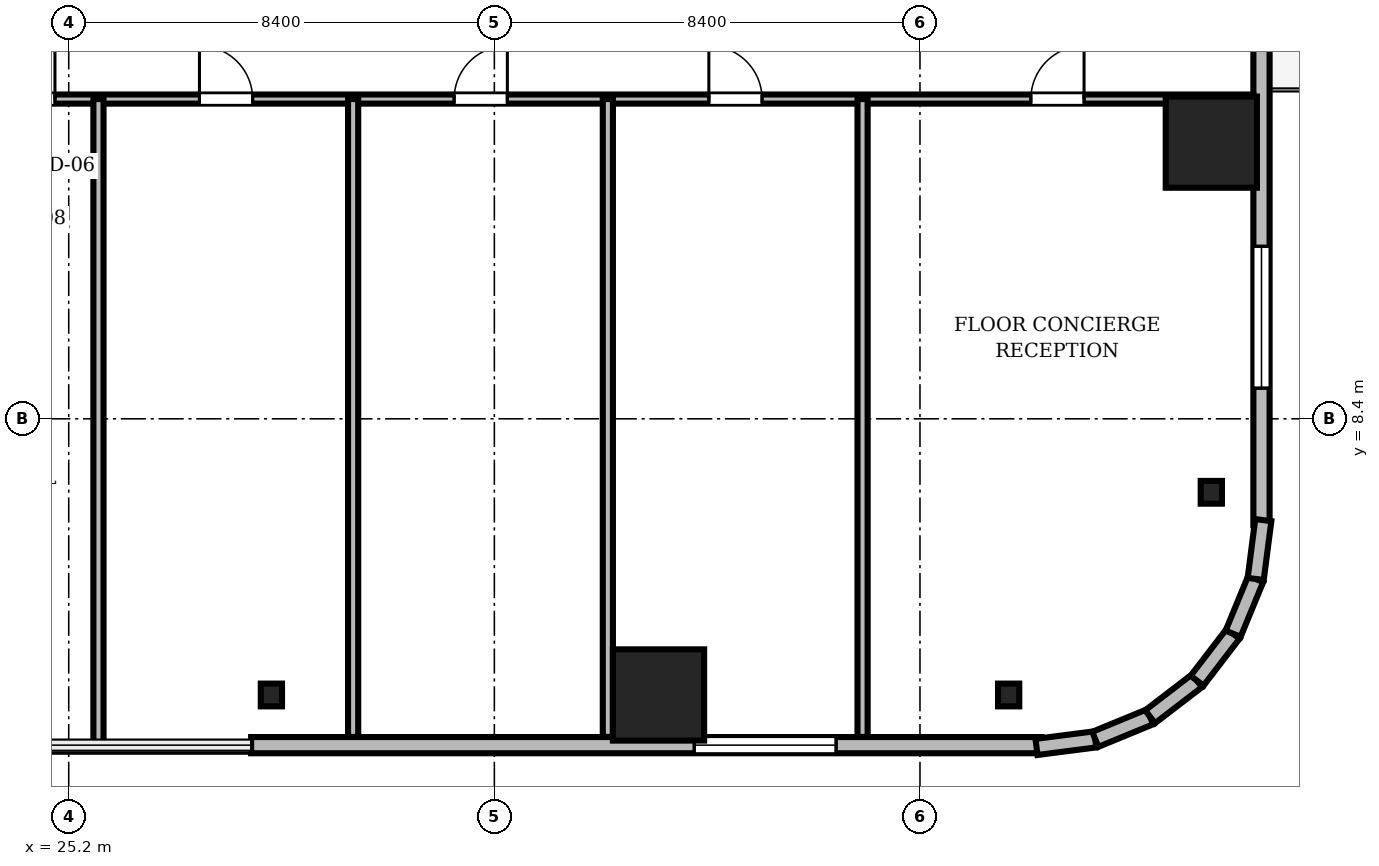
"""IFC4 building model, lengths in metres.
Left out: names, types, materials, properties, quantities, classifications, styles, units other than length and angle.
Written with IfcOpenShell. Run it as: python <this file> out.ifc"""

import sys

from ifc_helpers import new_model, si_unit, direction, frame, frame_2d, origin, origin_2d, place, context, subcontext, project, spatial, rectangle, i_section, extrude, source, transform, mapped, element, fill, save


model = new_model("IFC4")
c1 = context("Model", 3, precision=1e-05, world=origin(), true_north=direction((0.0, 1.0)))
c2 = subcontext(c1, "Body", "Model", "MODEL_VIEW")
j1 = project(units=[si_unit("LENGTHUNIT", "METRE"), si_unit("PLANEANGLEUNIT", "RADIAN")], contexts=[c1])
p1 = place(None, origin())
s1 = spatial("IfcSite", under=j1, at=p1, CompositionType="ELEMENT")
p2 = place(p1, origin())
s2 = spatial("IfcBuilding", under=s1, at=p2, CompositionType="ELEMENT")
p3 = place(p2, frame((0.0, 0.0, 42.2)))
s3 = spatial("IfcBuildingStorey", under=s2, at=p3, CompositionType="ELEMENT", Elevation=42.2)
m1 = source(origin(), c2, "Body", "SweptSolid", [
    extrude(rectangle(XDim=1.8, YDim=1.8, at=origin_2d()), origin(), (0.0, 0.0, 1.0), 3.41),
])
for number, where, z_axis, x_axis in (
    (1, (36.84, 2.95, 0.0), (0.0, 0.0, 1.0), (1.0, 0.0, 0.0)),
    (2, (47.75, 13.86, 0.0), (0.0, 0.0, 1.0), (1.0, 0.0, 0.0)),
):
    element("IfcColumn", number, at=place(p3, frame(where, z_axis=z_axis, x_axis=x_axis)), inside=s3, PredefinedType="COLUMN", context=c2, shape_type="MappedRepresentation", body=[
        mapped(m1, transform((0.0, 0.0, 0.0), scale=1.0)),
    ])
m2 = source(origin(), c2, "Body", "SweptSolid", [
    extrude(i_section(OverallWidth=0.419, OverallDepth=0.449, WebThickness=0.031, FlangeThickness=0.048, FilletRadius=0.015, at=origin_2d()), origin(), (0.0, 0.0, 1.0), 3.41),
])
for number, where, z_axis, x_axis in (
    (3, (29.2, 2.95, 0.0), (0.0, 0.0, 1.0), (1.0, 0.0, 0.0)),
    (4, (43.75, 2.95, 0.0), (0.0, 0.0, 1.0), (1.0, 0.0, 0.0)),
    (5, (47.75, 6.95, 0.0), (0.0, 0.0, 1.0), (1.0, 0.0, 0.0)),
):
    element("IfcColumn", number, at=place(p3, frame(where, z_axis=z_axis, x_axis=x_axis)), inside=s3, PredefinedType="COLUMN", context=c2, shape_type="MappedRepresentation", body=[
        mapped(m2, transform((0.0, 0.0, 0.0), scale=1.0)),
    ])
m3 = source(origin(), c2, "Body", "SweptSolid", [
    extrude(rectangle(XDim=15.6, YDim=0.32, at=frame_2d((7.8, 0.0))), origin(), (0.0, 0.0, 1.0), 3.41),
])
p4 = place(p3, frame((28.8, 1.96, 0.0), z_axis=(0.0, 0.0, 1.0), x_axis=(1.0, 0.0, 0.0)))
e6 = element("IfcWall", 6, at=p4, inside=s3, PredefinedType="SOLIDWALL", context=c2, shape_type="MappedRepresentation", body=[
    mapped(m3, transform((0.0, 0.0, 0.0), scale=1.0)),
])
m4 = source(origin(), c2, "Body", "SweptSolid", [
    extrude(rectangle(XDim=2.8, YDim=2.4, at=frame_2d((1.4, 1.2))), frame((0.0, 0.17, 0.0), z_axis=(0.0, -1.0, 0.0), x_axis=(1.0, 0.0, 0.0)), (0.0, 0.0, 1.0), 0.34),
])
p5 = place(p4, frame((8.745, 0.0, 0.72)))
e7 = element("IfcOpeningElement", 7, at=p5, cuts=e6, PredefinedType="OPENING", context=c2, shape_type="MappedRepresentation", body=[
    mapped(m4, transform((0.0, 0.0, 0.0), scale=1.0)),
])
p6 = place(p3, frame((48.74, 6.3, 0.0), z_axis=(0.0, 0.0, 1.0), x_axis=(0.0, 1.0, 0.0)))
e8 = element("IfcWall", 8, at=p6, inside=s3, PredefinedType="SOLIDWALL", context=c2, shape_type="MappedRepresentation", body=[
    mapped(m3, transform((0.0, 0.0, 0.0), scale=1.0)),
])
m5 = source(origin(), c2, "Body", "SweptSolid", [
    extrude(rectangle(XDim=1.4, YDim=2.3, at=frame_2d((0.7, 1.15))), frame((0.0, 0.17, 0.0), z_axis=(0.0, -1.0, 0.0), x_axis=(1.0, 0.0, 0.0)), (0.0, 0.0, 1.0), 0.34),
])
p7 = place(p6, frame((9.61, 0.0, 0.0)))
e9 = element("IfcOpeningElement", 9, at=p7, cuts=e8, PredefinedType="OPENING", context=c2, shape_type="MappedRepresentation", body=[
    mapped(m5, transform((0.0, 0.0, 0.0), scale=1.0)),
])
p8 = place(p6, frame((2.705, 0.0, 0.72)))
e10 = element("IfcOpeningElement", 10, at=p8, cuts=e8, PredefinedType="OPENING", context=c2, shape_type="MappedRepresentation", body=[
    mapped(m4, transform((0.0, 0.0, 0.0), scale=1.0)),
])
m6 = source(origin(), c2, "Body", "SweptSolid", [
    extrude(rectangle(XDim=1.17, YDim=0.32, at=frame_2d((0.585, 0.0))), origin(), (0.0, 0.0, 1.0), 3.41),
])
p9 = place(p3, frame((44.3, 1.925, 0.0), z_axis=(0.0, 0.0, 1.0), x_axis=(0.991762485493, 0.128090485085, 0.0)))
e11 = element("IfcWall", 11, at=p9, inside=s3, PredefinedType="SOLIDWALL", context=c2, shape_type="MappedRepresentation", body=[
    mapped(m6, transform((0.0, 0.0, 0.0), scale=1.0)),
])
m7 = source(origin(), c2, "Body", "SweptSolid", [
    extrude(rectangle(XDim=1.169, YDim=0.32, at=frame_2d((0.585, 0.0))), origin(), (0.0, 0.0, 1.0), 3.41),
])
p10 = place(p3, frame((45.46, 2.074, 0.0), z_axis=(0.0, 0.0, 1.0), x_axis=(0.924479075121, 0.381232789334, 0.0)))
e12 = element("IfcWall", 12, at=p10, inside=s3, PredefinedType="SOLIDWALL", context=c2, shape_type="MappedRepresentation", body=[
    mapped(m7, transform((0.0, 0.0, 0.0), scale=1.0)),
])
m8 = source(origin(), c2, "Body", "SweptSolid", [
    extrude(rectangle(XDim=1.169, YDim=0.32, at=frame_2d((0.584, 0.0))), origin(), (0.0, 0.0, 1.0), 3.41),
])
p11 = place(p3, frame((46.541, 2.52, 0.0), z_axis=(0.0, 0.0, 1.0), x_axis=(0.793663520347, 0.608356981114, 0.0)))
e13 = element("IfcWall", 13, at=p11, inside=s3, PredefinedType="SOLIDWALL", context=c2, shape_type="MappedRepresentation", body=[
    mapped(m8, transform((0.0, 0.0, 0.0), scale=1.0)),
])
m9 = source(origin(), c2, "Body", "SweptSolid", [
    extrude(rectangle(XDim=1.169, YDim=0.32, at=frame_2d((0.584, 0.0))), origin(), (0.0, 0.0, 1.0), 3.41),
])
for number, where, z_axis, x_axis in (
    (14, (47.469, 3.231, 0.0), (0.0, 0.0, 1.0), (0.608, 0.794, 0.0)),
    (15, (48.18, 4.159, 0.0), (0.0, 0.0, 1.0), (0.381, 0.925, 0.0)),
):
    element("IfcWall", number, at=place(p3, frame(where, z_axis=z_axis, x_axis=x_axis)), inside=s3, PredefinedType="SOLIDWALL", context=c2, shape_type="MappedRepresentation", body=[
        mapped(m9, transform((0.0, 0.0, 0.0), scale=1.0)),
    ])
m10 = source(origin(), c2, "Body", "SweptSolid", [
    extrude(rectangle(XDim=1.171, YDim=0.32, at=frame_2d((0.585, 0.0))), origin(), (0.0, 0.0, 1.0), 3.41),
])
p12 = place(p3, frame((48.625, 5.24, 0.0), z_axis=(0.0, 0.0, 1.0), x_axis=(0.128269133229, 0.991739395941, 0.0)))
e16 = element("IfcWall", 16, at=p12, inside=s3, PredefinedType="SOLIDWALL", context=c2, shape_type="MappedRepresentation", body=[
    mapped(m10, transform((0.0, 0.0, 0.0), scale=1.0)),
])
m11 = source(origin(), c2, "Body", "SweptSolid", [
    extrude(rectangle(XDim=46.156, YDim=0.18, at=frame_2d((23.078, 0.0))), origin(), (0.0, 0.0, 1.0), 2.652),
])
p13 = place(p3, frame((2.422, 14.71, 0.0), z_axis=(0.0, 0.0, 1.0), x_axis=(1.0, 0.0, 0.0)))
e17 = element("IfcWall", 17, at=p13, inside=s3, PredefinedType="PARTITIONING", context=c2, shape_type="MappedRepresentation", body=[
    mapped(m11, transform((0.0, 0.0, 0.0), scale=1.0)),
])
m12 = source(origin(), c2, "Body", "SweptSolid", [
    extrude(rectangle(XDim=1.05, YDim=2.2, at=frame_2d((0.525, 1.1))), frame((0.0, 0.1, 0.0), z_axis=(0.0, -1.0, 0.0), x_axis=(1.0, 0.0, 0.0)), (0.0, 0.0, 1.0), 0.2),
])
p14 = place(p13, frame((16.988, 0.0, 0.0)))
e18 = element("IfcOpeningElement", 18, at=p14, cuts=e17, PredefinedType="OPENING", context=c2, shape_type="MappedRepresentation", body=[
    mapped(m12, transform((0.0, 0.0, 0.0), scale=1.0)),
])
m13 = source(origin(), c2, "Body", "SweptSolid", [
    extrude(rectangle(XDim=0.95, YDim=2.15, at=frame_2d((0.475, 1.075))), frame((0.0, 0.1, 0.0), z_axis=(0.0, -1.0, 0.0), x_axis=(1.0, 0.0, 0.0)), (0.0, 0.0, 1.0), 0.2),
])
p15 = place(p13, frame((21.556, 0.0, 0.0)))
e19 = element("IfcOpeningElement", 19, at=p15, cuts=e17, PredefinedType="OPENING", context=c2, shape_type="MappedRepresentation", body=[
    mapped(m13, transform((0.0, 0.0, 0.0), scale=1.0)),
])
p16 = place(p13, frame((25.358, 0.0, 0.0)))
e20 = element("IfcOpeningElement", 20, at=p16, cuts=e17, PredefinedType="OPENING", context=c2, shape_type="MappedRepresentation", body=[
    mapped(m12, transform((0.0, 0.0, 0.0), scale=1.0)),
])
p17 = place(p13, frame((30.385, 0.0, 0.0)))
e21 = element("IfcOpeningElement", 21, at=p17, cuts=e17, PredefinedType="OPENING", context=c2, shape_type="MappedRepresentation", body=[
    mapped(m12, transform((0.0, 0.0, 0.0), scale=1.0)),
])
p18 = place(p13, frame((35.411, 0.0, 0.0)))
e22 = element("IfcOpeningElement", 22, at=p18, cuts=e17, PredefinedType="OPENING", context=c2, shape_type="MappedRepresentation", body=[
    mapped(m12, transform((0.0, 0.0, 0.0), scale=1.0)),
])
p19 = place(p13, frame((41.766, 0.0, 0.0)))
e23 = element("IfcOpeningElement", 23, at=p19, cuts=e17, PredefinedType="OPENING", context=c2, shape_type="MappedRepresentation", body=[
    mapped(m12, transform((0.0, 0.0, 0.0), scale=1.0)),
])
m14 = source(origin(), c2, "Body", "SweptSolid", [
    extrude(rectangle(XDim=12.78, YDim=0.2, at=frame_2d((6.39, 0.0))), origin(), (0.0, 0.0, 1.0), 2.652),
])
p20 = place(p3, frame((25.787, 1.93, 0.0), z_axis=(0.0, 0.0, 1.0), x_axis=(0.0, 1.0, 0.0)))
e24 = element("IfcWall", 24, at=p20, inside=s3, PredefinedType="PARTITIONING", context=c2, shape_type="MappedRepresentation", body=[
    mapped(m14, transform((0.0, 0.0, 0.0), scale=1.0)),
])
m15 = source(origin(), c2, "Body", "SweptSolid", [
    extrude(rectangle(XDim=12.588, YDim=0.2, at=frame_2d((6.294, 0.0))), origin(), (0.0, 0.0, 1.0), 2.652),
])
for number, where, z_axis, x_axis in (
    (25, (30.813, 2.122, 0.0), (0.0, 0.0, 1.0), (0.0, 1.0, 0.0)),
    (26, (35.84, 2.122, 0.0), (0.0, 0.0, 1.0), (0.0, 1.0, 0.0)),
    (27, (40.867, 2.122, 0.0), (0.0, 0.0, 1.0), (0.0, 1.0, 0.0)),
):
    element("IfcWall", number, at=place(p3, frame(where, z_axis=z_axis, x_axis=x_axis)), inside=s3, PredefinedType="PARTITIONING", context=c2, shape_type="MappedRepresentation", body=[
        mapped(m15, transform((0.0, 0.0, 0.0), scale=1.0)),
    ])
m16 = source(origin(), c2, "Body", "SweptSolid", [
    extrude(rectangle(XDim=2.8, YDim=2.4, at=frame_2d((1.4, 1.2))), frame((0.0, 0.03, 0.0), z_axis=(0.0, -1.0, 0.0), x_axis=(1.0, 0.0, 0.0)), (0.0, 0.0, 1.0), 0.06),
])
p21 = place(p5, origin())
e28 = element("IfcWindow", 28, at=p21, inside=s3, PartitioningType="SINGLE_PANEL", PredefinedType="WINDOW", context=c2, shape_type="MappedRepresentation", body=[
    mapped(m16, transform((0.0, 0.0, 0.0), scale=1.0)),
])
fill(e7, e28)
p22 = place(p8, origin())
e29 = element("IfcWindow", 29, at=p22, inside=s3, PartitioningType="SINGLE_PANEL", PredefinedType="WINDOW", context=c2, shape_type="MappedRepresentation", body=[
    mapped(m16, transform((0.0, 0.0, 0.0), scale=1.0)),
])
fill(e10, e29)
m17 = source(origin(), c2, "Body", "SweptSolid", [
    extrude(rectangle(XDim=0.95, YDim=2.15, at=frame_2d((0.475, 1.075))), frame((0.0, 0.025, 0.0), z_axis=(0.0, -1.0, 0.0), x_axis=(1.0, 0.0, 0.0)), (0.0, 0.0, 1.0), 0.05),
])
p23 = place(p15, origin())
e30 = element("IfcDoor", 30, at=p23, inside=s3, OperationType="SINGLE_SWING_RIGHT", PredefinedType="DOOR", context=c2, shape_type="MappedRepresentation", body=[
    mapped(m17, transform((0.0, 0.0, 0.0), scale=1.0)),
])
fill(e19, e30)
m18 = source(origin(), c2, "Body", "SweptSolid", [
    extrude(rectangle(XDim=1.05, YDim=2.2, at=frame_2d((0.525, 1.1))), frame((0.0, 0.025, 0.0), z_axis=(0.0, -1.0, 0.0), x_axis=(1.0, 0.0, 0.0)), (0.0, 0.0, 1.0), 0.05),
])
p24 = place(p16, origin())
e31 = element("IfcDoor", 31, at=p24, inside=s3, OperationType="SINGLE_SWING_LEFT", PredefinedType="DOOR", context=c2, shape_type="MappedRepresentation", body=[
    mapped(m18, transform((0.0, 0.0, 0.0), scale=1.0)),
])
fill(e20, e31)
p25 = place(p17, origin())
e32 = element("IfcDoor", 32, at=p25, inside=s3, OperationType="SINGLE_SWING_RIGHT", PredefinedType="DOOR", context=c2, shape_type="MappedRepresentation", body=[
    mapped(m18, transform((0.0, 0.0, 0.0), scale=1.0)),
])
fill(e21, e32)
p26 = place(p18, origin())
e33 = element("IfcDoor", 33, at=p26, inside=s3, OperationType="SINGLE_SWING_LEFT", PredefinedType="DOOR", context=c2, shape_type="MappedRepresentation", body=[
    mapped(m18, transform((0.0, 0.0, 0.0), scale=1.0)),
])
fill(e22, e33)
p27 = place(p19, origin())
e34 = element("IfcDoor", 34, at=p27, inside=s3, OperationType="SINGLE_SWING_RIGHT", PredefinedType="DOOR", context=c2, shape_type="MappedRepresentation", body=[
    mapped(m18, transform((0.0, 0.0, 0.0), scale=1.0)),
])
fill(e23, e34)
save(model, sys.argv[1])
